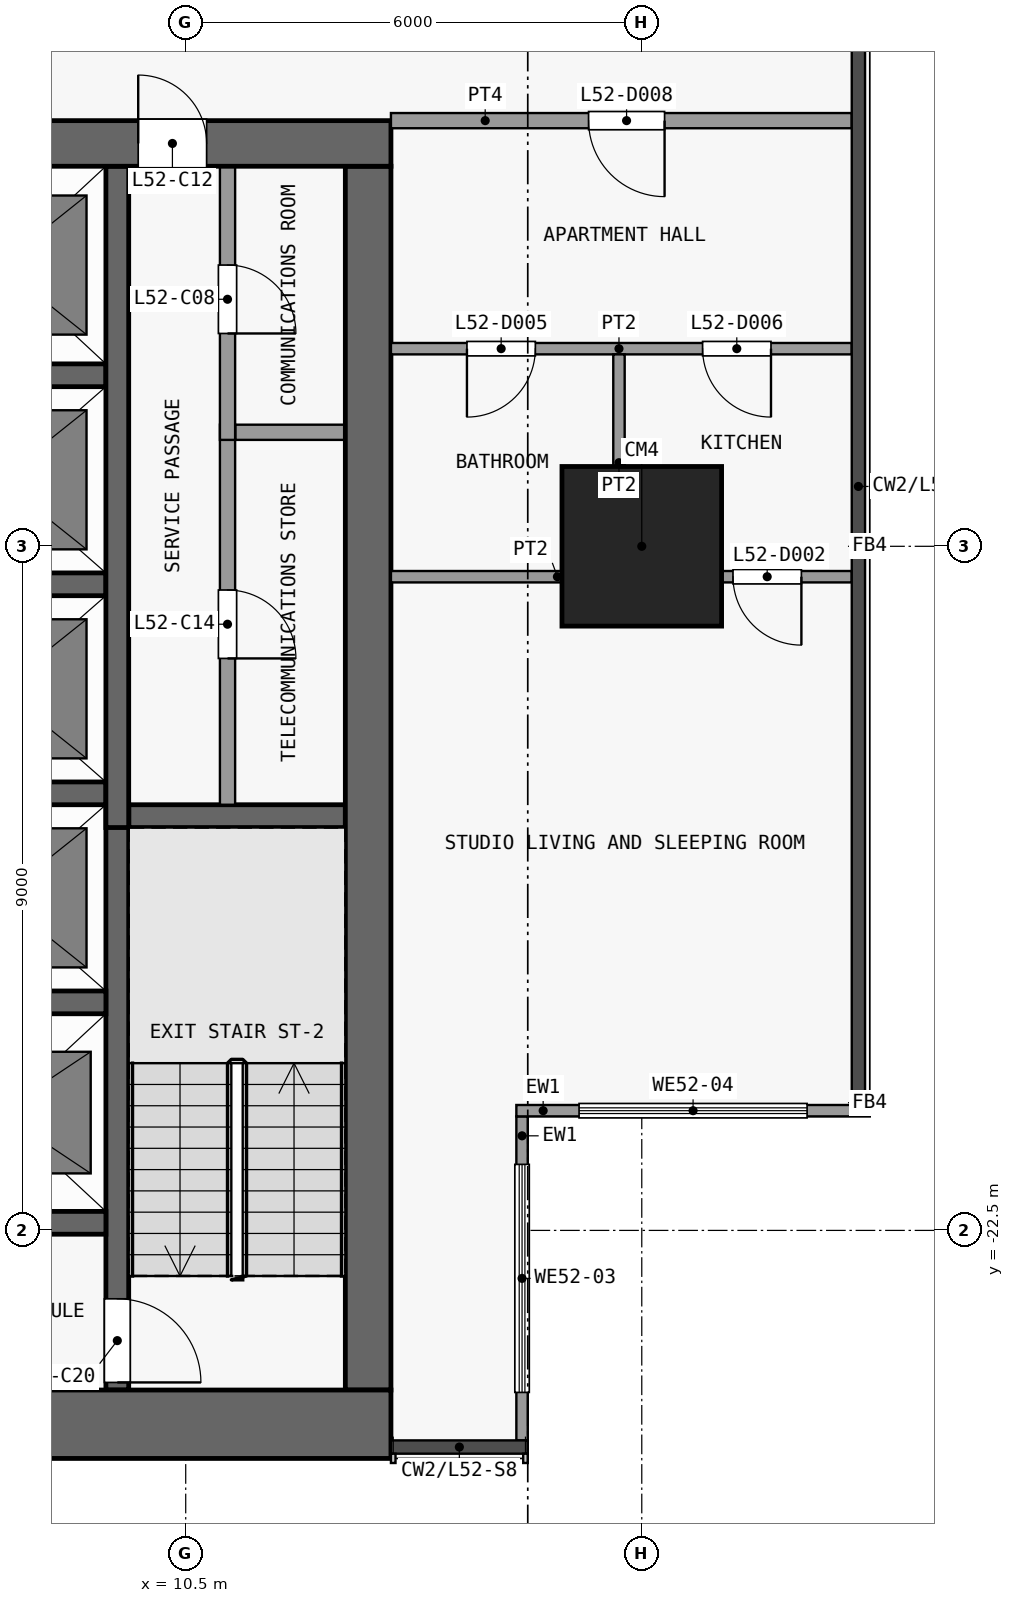
"""IFC4 building model, lengths in metres.
Left out: names, types, materials, properties, quantities, classifications, styles, units other than length and angle.
Written with IfcOpenShell. Run it as: python <this file> out.ifc"""

import sys

from ifc_helpers import new_model, si_unit, direction, frame, frame_2d, origin, origin_2d, place, context, subcontext, project, spatial, rectangle, extrude, element, fill, save


model = new_model("IFC4")
c1 = context("Model", 3, precision=1e-05, world=origin(), true_north=direction((0.0, 1.0)))
c2 = subcontext(c1, "Body", "Model", "MODEL_VIEW")
j1 = project(units=[si_unit("LENGTHUNIT", "METRE"), si_unit("PLANEANGLEUNIT", "RADIAN")], contexts=[c1])
p1 = place(None, origin())
s1 = spatial("IfcSite", under=j1, at=p1, CompositionType="ELEMENT")
p2 = place(p1, origin())
s2 = spatial("IfcBuilding", under=s1, at=p2, CompositionType="ELEMENT")
p3 = place(p2, frame((0.0, 0.0, 208.7)))
s3 = spatial("IfcBuildingStorey", under=s2, at=p3, CompositionType="ELEMENT", Elevation=208.7)
p4 = place(p3, frame((16.5, -13.5, 0.0), z_axis=(0.0, 0.0, 1.0), x_axis=(1.0, 0.0, 0.0)))
e1 = element("IfcColumn", 1, at=p4, inside=s3, PredefinedType="COLUMN", context=c2, shape_type="SweptSolid", body=[
    extrude(rectangle(XDim=2.1, YDim=2.1, at=origin_2d()), origin(), (0.0, 0.0, 1.0), 3.6),
])
p5 = place(p3, frame((-13.2, -25.05, 0.0), z_axis=(0.0, 0.0, 1.0), x_axis=(1.0, 0.0, 0.0)))
e2 = element("IfcWall", 2, at=p5, inside=s3, PredefinedType="SHEAR", context=c2, shape_type="SweptSolid", body=[
    extrude(rectangle(XDim=26.4, YDim=0.9, at=frame_2d((13.2, 0.0))), origin(), (0.0, 0.0, 1.0), 3.3),
])
p6 = place(p3, frame((-13.2, -8.2, 0.0), z_axis=(0.0, 0.0, 1.0), x_axis=(1.0, 0.0, 0.0)))
e3 = element("IfcWall", 3, at=p6, inside=s3, PredefinedType="SHEAR", context=c2, shape_type="SweptSolid", body=[
    extrude(rectangle(XDim=26.4, YDim=0.6, at=frame_2d((13.2, 0.0))), origin(), (0.0, 0.0, 1.0), 3.3),
])
p7 = place(p6, frame((7.5, 0.0, 0.0)))
e4 = element("IfcOpeningElement", 4, at=p7, cuts=e3, PredefinedType="OPENING", context=c2, shape_type="SweptSolid", body=[
    extrude(rectangle(XDim=1.8, YDim=2.1, at=frame_2d((0.9, 1.05))), frame((0.0, 0.31, 0.0), z_axis=(0.0, -1.0, 0.0), x_axis=(1.0, 0.0, 0.0)), (0.0, 0.0, 1.0), 0.62),
])
p8 = place(p6, frame((17.1, 0.0, 0.0)))
e5 = element("IfcOpeningElement", 5, at=p8, cuts=e3, PredefinedType="OPENING", context=c2, shape_type="SweptSolid", body=[
    extrude(rectangle(XDim=1.8, YDim=2.1, at=frame_2d((0.9, 1.05))), frame((0.0, 0.31, 0.0), z_axis=(0.0, -1.0, 0.0), x_axis=(1.0, 0.0, 0.0)), (0.0, 0.0, 1.0), 0.62),
])
p9 = place(p6, frame((2.425, 0.0, 0.0)))
e6 = element("IfcOpeningElement", 6, at=p9, cuts=e3, PredefinedType="OPENING", context=c2, shape_type="SweptSolid", body=[
    extrude(rectangle(XDim=0.9, YDim=2.1, at=frame_2d((0.45, 1.05))), frame((0.0, 0.31, 0.0), z_axis=(0.0, -1.0, 0.0), x_axis=(1.0, 0.0, 0.0)), (0.0, 0.0, 1.0), 0.62),
])
p10 = place(p6, frame((23.075, 0.0, 0.0)))
e7 = element("IfcOpeningElement", 7, at=p10, cuts=e3, PredefinedType="OPENING", context=c2, shape_type="SweptSolid", body=[
    extrude(rectangle(XDim=0.9, YDim=2.1, at=frame_2d((0.45, 1.05))), frame((0.0, 0.31, 0.0), z_axis=(0.0, -1.0, 0.0), x_axis=(1.0, 0.0, 0.0)), (0.0, 0.0, 1.0), 0.62),
])
p11 = place(p3, frame((12.9, -24.6, 0.0), z_axis=(0.0, 0.0, 1.0), x_axis=(0.0, 1.0, 0.0)))
e8 = element("IfcWall", 8, at=p11, inside=s3, PredefinedType="SHEAR", context=c2, shape_type="SweptSolid", body=[
    extrude(rectangle(XDim=16.1, YDim=0.6, at=frame_2d((8.05, 0.0))), origin(), (0.0, 0.0, 1.0), 3.3),
])
for number, where, z_axis, x_axis in (
    (9, (6.65, -22.4, 0.0), (0.0, 0.0, 1.0), (1.0, 0.0, 0.0)),
    (10, (6.65, -19.5, 0.0), (0.0, 0.0, 1.0), (1.0, 0.0, 0.0)),
):
    element("IfcWall", number, at=place(p3, frame(where, z_axis=z_axis, x_axis=x_axis)), inside=s3, PredefinedType="SHEAR", context=c2, shape_type="SweptSolid", body=[
        extrude(rectangle(XDim=2.8, YDim=0.3, at=frame_2d((1.4, 0.0))), origin(), (0.0, 0.0, 1.0), 3.3),
    ])
p12 = place(p3, frame((9.75, -17.05, 0.0), z_axis=(0.0, 0.0, 1.0), x_axis=(1.0, 0.0, 0.0)))
e11 = element("IfcWall", 11, at=p12, inside=s3, PredefinedType="SHEAR", context=c2, shape_type="SweptSolid", body=[
    extrude(rectangle(XDim=2.85, YDim=0.3, at=frame_2d((1.425, 0.0))), origin(), (0.0, 0.0, 1.0), 3.3),
])
for number, where, z_axis, x_axis in (
    (12, (6.65, -16.75, 0.0), (0.0, 0.0, 1.0), (1.0, 0.0, 0.0)),
    (13, (6.65, -14.0, 0.0), (0.0, 0.0, 1.0), (1.0, 0.0, 0.0)),
):
    element("IfcWall", number, at=place(p3, frame(where, z_axis=z_axis, x_axis=x_axis)), inside=s3, PredefinedType="SHEAR", context=c2, shape_type="SweptSolid", body=[
        extrude(rectangle(XDim=2.8, YDim=0.3, at=frame_2d((1.4, 0.0))), origin(), (0.0, 0.0, 1.0), 3.3),
    ])
p13 = place(p3, frame((11.15, -12.0, 0.0), z_axis=(0.0, 0.0, 1.0), x_axis=(1.0, 0.0, 0.0)))
e14 = element("IfcWall", 14, at=p13, inside=s3, PredefinedType="PARTITIONING", context=c2, shape_type="SweptSolid", body=[
    extrude(rectangle(XDim=1.45, YDim=0.2, at=frame_2d((0.725, 0.0))), origin(), (0.0, 0.0, 1.0), 3.3),
])
p14 = place(p3, frame((6.65, -11.25, 0.0), z_axis=(0.0, 0.0, 1.0), x_axis=(1.0, 0.0, 0.0)))
e15 = element("IfcWall", 15, at=p14, inside=s3, PredefinedType="SHEAR", context=c2, shape_type="SweptSolid", body=[
    extrude(rectangle(XDim=2.8, YDim=0.3, at=frame_2d((1.4, 0.0))), origin(), (0.0, 0.0, 1.0), 3.3),
])
p15 = place(p3, frame((9.6, -16.9, 0.0), z_axis=(0.0, 0.0, 1.0), x_axis=(0.0, -1.0, 0.0)))
e16 = element("IfcWall", 16, at=p15, inside=s3, PredefinedType="SHEAR", context=c2, shape_type="SweptSolid", body=[
    extrude(rectangle(XDim=7.7, YDim=0.3, at=frame_2d((3.85, 0.0))), origin(), (0.0, 0.0, 1.0), 3.3),
])
p16 = place(p15, frame((6.5, 0.0, 0.0)))
e17 = element("IfcOpeningElement", 17, at=p16, cuts=e16, PredefinedType="OPENING", context=c2, shape_type="SweptSolid", body=[
    extrude(rectangle(XDim=1.1, YDim=2.1, at=frame_2d((0.55, 1.05))), frame((0.0, 0.16, 0.0), z_axis=(0.0, -1.0, 0.0), x_axis=(1.0, 0.0, 0.0)), (0.0, 0.0, 1.0), 0.32),
])
p17 = place(p3, frame((9.6, -17.2, 0.0), z_axis=(0.0, 0.0, 1.0), x_axis=(0.0, 1.0, 0.0)))
e18 = element("IfcWall", 18, at=p17, inside=s3, PredefinedType="SHEAR", context=c2, shape_type="SweptSolid", body=[
    extrude(rectangle(XDim=8.7, YDim=0.3, at=frame_2d((4.35, 0.0))), origin(), (0.0, 0.0, 1.0), 3.3),
])
p18 = place(p3, frame((11.05, -11.9, 0.0), z_axis=(0.0, 0.0, 1.0), x_axis=(0.0, -1.0, 0.0)))
e19 = element("IfcWall", 19, at=p18, inside=s3, PredefinedType="PARTITIONING", context=c2, shape_type="SweptSolid", body=[
    extrude(rectangle(XDim=5.0, YDim=0.2, at=frame_2d((2.5, 0.0))), origin(), (0.0, 0.0, 1.0), 3.3),
])
p19 = place(p18, frame((2.175, 0.0, 0.0)))
e20 = element("IfcOpeningElement", 20, at=p19, cuts=e19, PredefinedType="OPENING", context=c2, shape_type="SweptSolid", body=[
    extrude(rectangle(XDim=0.9, YDim=2.1, at=frame_2d((0.45, 1.05))), frame((0.0, 0.11, 0.0), z_axis=(0.0, -1.0, 0.0), x_axis=(1.0, 0.0, 0.0)), (0.0, 0.0, 1.0), 0.22),
])
p20 = place(p3, frame((11.05, -8.5, 0.0), z_axis=(0.0, 0.0, 1.0), x_axis=(0.0, -1.0, 0.0)))
e21 = element("IfcWall", 21, at=p20, inside=s3, PredefinedType="PARTITIONING", context=c2, shape_type="SweptSolid", body=[
    extrude(rectangle(XDim=3.6, YDim=0.2, at=frame_2d((1.8, 0.0))), origin(), (0.0, 0.0, 1.0), 3.3),
])
p21 = place(p20, frame((1.3, 0.0, 0.0)))
e22 = element("IfcOpeningElement", 22, at=p21, cuts=e21, PredefinedType="OPENING", context=c2, shape_type="SweptSolid", body=[
    extrude(rectangle(XDim=0.9, YDim=2.1, at=frame_2d((0.45, 1.05))), frame((0.0, 0.11, 0.0), z_axis=(0.0, -1.0, 0.0), x_axis=(1.0, 0.0, 0.0)), (0.0, 0.0, 1.0), 0.22),
])
p22 = place(p3, frame((14.925, -21.0, 0.0), z_axis=(0.0, 0.0, 1.0), x_axis=(0.0, -1.0, 0.0)))
e23 = element("IfcWall", 23, at=p22, inside=s3, PredefinedType="SOLIDWALL", context=c2, shape_type="SweptSolid", body=[
    extrude(rectangle(XDim=4.262, YDim=0.15, at=frame_2d((2.131, 0.0))), origin(), (0.0, 0.0, 1.0), 3.3),
])
p23 = place(p22, frame((0.631, 0.0, 0.9)))
e24 = element("IfcOpeningElement", 24, at=p23, cuts=e23, PredefinedType="OPENING", context=c2, shape_type="SweptSolid", body=[
    extrude(rectangle(XDim=3.0, YDim=2.4, at=frame_2d((1.5, 1.2))), frame((0.0, 0.085, 0.0), z_axis=(0.0, -1.0, 0.0), x_axis=(1.0, 0.0, 0.0)), (0.0, 0.0, 1.0), 0.17),
])
p24 = place(p3, frame((19.5, -20.925, 0.0), z_axis=(0.0, 0.0, 1.0), x_axis=(-1.0, 0.0, 0.0)))
e25 = element("IfcWall", 25, at=p24, inside=s3, PredefinedType="SOLIDWALL", context=c2, shape_type="SweptSolid", body=[
    extrude(rectangle(XDim=4.65, YDim=0.15, at=frame_2d((2.325, 0.0))), origin(), (0.0, 0.0, 1.0), 3.3),
])
p25 = place(p24, frame((0.825, 0.0, 0.9)))
e26 = element("IfcOpeningElement", 26, at=p25, cuts=e25, PredefinedType="OPENING", context=c2, shape_type="SweptSolid", body=[
    extrude(rectangle(XDim=3.0, YDim=2.4, at=frame_2d((1.5, 1.2))), frame((0.0, 0.085, 0.0), z_axis=(0.0, -1.0, 0.0), x_axis=(1.0, 0.0, 0.0)), (0.0, 0.0, 1.0), 0.17),
])
p26 = place(p3, frame((13.2, -13.9, 0.0), z_axis=(0.0, 0.0, 1.0), x_axis=(1.0, 0.0, 0.0)))
e27 = element("IfcWall", 27, at=p26, inside=s3, PredefinedType="PARTITIONING", context=c2, shape_type="SweptSolid", body=[
    extrude(rectangle(XDim=6.062, YDim=0.15, at=frame_2d((3.031, 0.0))), origin(), (0.0, 0.0, 1.0), 3.3),
])
p27 = place(p26, frame((4.5, 0.0, 0.0)))
e28 = element("IfcOpeningElement", 28, at=p27, cuts=e27, PredefinedType="OPENING", context=c2, shape_type="SweptSolid", body=[
    extrude(rectangle(XDim=0.9, YDim=2.1, at=frame_2d((0.45, 1.05))), frame((0.0, 0.085, 0.0), z_axis=(0.0, -1.0, 0.0), x_axis=(1.0, 0.0, 0.0)), (0.0, 0.0, 1.0), 0.17),
])
p28 = place(p3, frame((13.2, -10.9, 0.0), z_axis=(0.0, 0.0, 1.0), x_axis=(1.0, 0.0, 0.0)))
e29 = element("IfcWall", 29, at=p28, inside=s3, PredefinedType="PARTITIONING", context=c2, shape_type="SweptSolid", body=[
    extrude(rectangle(XDim=6.062, YDim=0.15, at=frame_2d((3.031, 0.0))), origin(), (0.0, 0.0, 1.0), 3.3),
])
p29 = place(p28, frame((1.0, 0.0, 0.0)))
e30 = element("IfcOpeningElement", 30, at=p29, cuts=e29, PredefinedType="OPENING", context=c2, shape_type="SweptSolid", body=[
    extrude(rectangle(XDim=0.9, YDim=2.1, at=frame_2d((0.45, 1.05))), frame((0.0, 0.085, 0.0), z_axis=(0.0, -1.0, 0.0), x_axis=(1.0, 0.0, 0.0)), (0.0, 0.0, 1.0), 0.17),
])
p30 = place(p28, frame((4.1, 0.0, 0.0)))
e31 = element("IfcOpeningElement", 31, at=p30, cuts=e29, PredefinedType="OPENING", context=c2, shape_type="SweptSolid", body=[
    extrude(rectangle(XDim=0.9, YDim=2.1, at=frame_2d((0.45, 1.05))), frame((0.0, 0.085, 0.0), z_axis=(0.0, -1.0, 0.0), x_axis=(1.0, 0.0, 0.0)), (0.0, 0.0, 1.0), 0.17),
])
p31 = place(p3, frame((13.2, -7.9, 0.0), z_axis=(0.0, 0.0, 1.0), x_axis=(1.0, 0.0, 0.0)))
e32 = element("IfcWall", 32, at=p31, inside=s3, PredefinedType="PARTITIONING", context=c2, shape_type="SweptSolid", body=[
    extrude(rectangle(XDim=6.062, YDim=0.2, at=frame_2d((3.031, 0.0))), origin(), (0.0, 0.0, 1.0), 3.3),
])
p32 = place(p31, frame((2.6, 0.0, 0.0)))
e33 = element("IfcOpeningElement", 33, at=p32, cuts=e32, PredefinedType="OPENING", context=c2, shape_type="SweptSolid", body=[
    extrude(rectangle(XDim=1.0, YDim=2.1, at=frame_2d((0.5, 1.05))), frame((0.0, 0.11, 0.0), z_axis=(0.0, -1.0, 0.0), x_axis=(1.0, 0.0, 0.0)), (0.0, 0.0, 1.0), 0.22),
])
p33 = place(p3, frame((16.2, -13.825, 0.0), z_axis=(0.0, 0.0, 1.0), x_axis=(0.0, 1.0, 0.0)))
e34 = element("IfcWall", 34, at=p33, inside=s3, PredefinedType="PARTITIONING", context=c2, shape_type="SweptSolid", body=[
    extrude(rectangle(XDim=2.85, YDim=0.15, at=frame_2d((1.425, 0.0))), origin(), (0.0, 0.0, 1.0), 3.3),
])
p34 = place(p21, origin())
e35 = element("IfcDoor", 35, at=p34, inside=s3, OperationType="SINGLE_SWING_RIGHT", PredefinedType="DOOR", context=c2, shape_type="SweptSolid", body=[
    extrude(rectangle(XDim=0.9, YDim=2.1, at=frame_2d((0.45, 1.05))), frame((0.0, 0.025, 0.0), z_axis=(0.0, -1.0, 0.0), x_axis=(1.0, 0.0, 0.0)), (0.0, 0.0, 1.0), 0.05),
])
fill(e22, e35)
p35 = place(p10, origin())
e36 = element("IfcDoor", 36, at=p35, inside=s3, OperationType="SINGLE_SWING_LEFT", PredefinedType="DOOR", context=c2, shape_type="SweptSolid", body=[
    extrude(rectangle(XDim=0.9, YDim=2.1, at=frame_2d((0.45, 1.05))), frame((0.0, 0.025, 0.0), z_axis=(0.0, -1.0, 0.0), x_axis=(1.0, 0.0, 0.0)), (0.0, 0.0, 1.0), 0.05),
])
fill(e7, e36)
p36 = place(p19, origin())
e37 = element("IfcDoor", 37, at=p36, inside=s3, OperationType="SINGLE_SWING_RIGHT", PredefinedType="DOOR", context=c2, shape_type="SweptSolid", body=[
    extrude(rectangle(XDim=0.9, YDim=2.1, at=frame_2d((0.45, 1.05))), frame((0.0, 0.025, 0.0), z_axis=(0.0, -1.0, 0.0), x_axis=(1.0, 0.0, 0.0)), (0.0, 0.0, 1.0), 0.05),
])
fill(e20, e37)
p37 = place(p16, origin())
e38 = element("IfcDoor", 38, at=p37, inside=s3, OperationType="SINGLE_SWING_RIGHT", PredefinedType="DOOR", context=c2, shape_type="SweptSolid", body=[
    extrude(rectangle(XDim=1.1, YDim=2.1, at=frame_2d((0.55, 1.05))), frame((0.0, 0.025, 0.0), z_axis=(0.0, -1.0, 0.0), x_axis=(1.0, 0.0, 0.0)), (0.0, 0.0, 1.0), 0.05),
])
fill(e17, e38)
p38 = place(p23, origin())
e39 = element("IfcWindow", 39, at=p38, inside=s3, PartitioningType="SINGLE_PANEL", PredefinedType="WINDOW", context=c2, shape_type="SweptSolid", body=[
    extrude(rectangle(XDim=3.0, YDim=2.4, at=frame_2d((1.5, 1.2))), frame((0.0, 0.03, 0.0), z_axis=(0.0, -1.0, 0.0), x_axis=(1.0, 0.0, 0.0)), (0.0, 0.0, 1.0), 0.06),
])
fill(e24, e39)
p39 = place(p25, origin())
e40 = element("IfcWindow", 40, at=p39, inside=s3, PartitioningType="SINGLE_PANEL", PredefinedType="WINDOW", context=c2, shape_type="SweptSolid", body=[
    extrude(rectangle(XDim=3.0, YDim=2.4, at=frame_2d((1.5, 1.2))), frame((0.0, 0.03, 0.0), z_axis=(0.0, -1.0, 0.0), x_axis=(1.0, 0.0, 0.0)), (0.0, 0.0, 1.0), 0.06),
])
fill(e26, e40)
p40 = place(p27, origin())
e41 = element("IfcDoor", 41, at=p40, inside=s3, OperationType="SINGLE_SWING_RIGHT", PredefinedType="DOOR", context=c2, shape_type="SweptSolid", body=[
    extrude(rectangle(XDim=0.9, YDim=2.1, at=frame_2d((0.45, 1.05))), frame((0.0, 0.025, 0.0), z_axis=(0.0, -1.0, 0.0), x_axis=(1.0, 0.0, 0.0)), (0.0, 0.0, 1.0), 0.05),
])
fill(e28, e41)
p41 = place(p29, origin())
e42 = element("IfcDoor", 42, at=p41, inside=s3, OperationType="SINGLE_SWING_LEFT", PredefinedType="DOOR", context=c2, shape_type="SweptSolid", body=[
    extrude(rectangle(XDim=0.9, YDim=2.1, at=frame_2d((0.45, 1.05))), frame((0.0, 0.025, 0.0), z_axis=(0.0, -1.0, 0.0), x_axis=(1.0, 0.0, 0.0)), (0.0, 0.0, 1.0), 0.05),
])
fill(e30, e42)
p42 = place(p30, origin())
e43 = element("IfcDoor", 43, at=p42, inside=s3, OperationType="SINGLE_SWING_RIGHT", PredefinedType="DOOR", context=c2, shape_type="SweptSolid", body=[
    extrude(rectangle(XDim=0.9, YDim=2.1, at=frame_2d((0.45, 1.05))), frame((0.0, 0.025, 0.0), z_axis=(0.0, -1.0, 0.0), x_axis=(1.0, 0.0, 0.0)), (0.0, 0.0, 1.0), 0.05),
])
fill(e31, e43)
p43 = place(p32, origin())
e44 = element("IfcDoor", 44, at=p43, inside=s3, OperationType="SINGLE_SWING_RIGHT", PredefinedType="DOOR", context=c2, shape_type="SweptSolid", body=[
    extrude(rectangle(XDim=1.0, YDim=2.1, at=frame_2d((0.5, 1.05))), frame((0.0, 0.025, 0.0), z_axis=(0.0, -1.0, 0.0), x_axis=(1.0, 0.0, 0.0)), (0.0, 0.0, 1.0), 0.05),
])
fill(e33, e44)
save(model, sys.argv[1])
